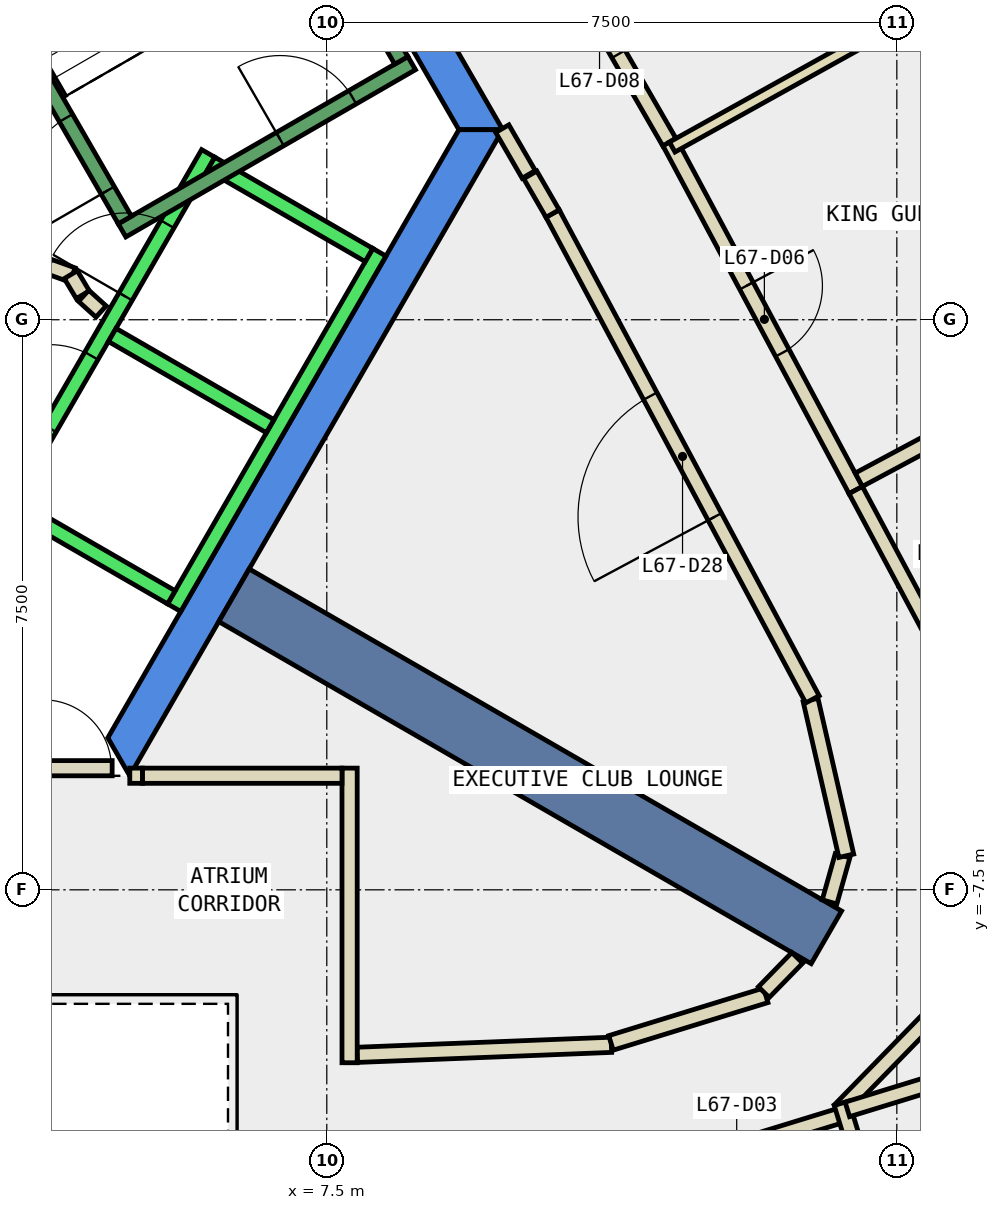
"""IFC4 building model, lengths in metres.
Left out: names, types, materials, properties, quantities, classifications, styles, units other than length and angle.
Written with IfcOpenShell. Run it as: python <this file> out.ifc"""

import sys

from ifc_helpers import new_model, si_unit, direction, frame, frame_2d, origin, place, context, subcontext, project, spatial, polyline, rectangle, outline, extrude, element, fill, save


model = new_model("IFC4")
c1 = context("Model", 3, precision=1e-05, world=origin(), true_north=direction((0.0, 1.0)))
c2 = subcontext(c1, "Body", "Model", "MODEL_VIEW")
j1 = project(units=[si_unit("LENGTHUNIT", "METRE"), si_unit("PLANEANGLEUNIT", "RADIAN")], contexts=[c1])
p1 = place(None, origin())
s1 = spatial("IfcSite", under=j1, at=p1, CompositionType="ELEMENT")
p2 = place(p1, origin())
s2 = spatial("IfcBuilding", under=s1, at=p2, CompositionType="ELEMENT")
p3 = place(p2, frame((0.0, 0.0, 290.0)))
s3 = spatial("IfcBuildingStorey", under=s2, at=p3, CompositionType="ELEMENT", Elevation=290.0)
p4 = place(p3, frame((0.0, 0.0, -0.34)))
e1 = element("IfcWall", 1, at=p4, inside=s3, PredefinedType="SHEAR", context=c2, shape_type="SweptSolid", body=[
    extrude(outline(polyline([(5.486, 9.998), (5.053, 9.748), (9.238, 2.5), (9.815, 2.5), (5.486, 9.998)])), origin(), (0.0, 0.0, 1.0), 3.6),
])
p5 = place(p3, frame((0.0, 0.0, -0.34)))
e2 = element("IfcWall", 2, at=p5, inside=s3, PredefinedType="SHEAR", context=c2, shape_type="SweptSolid", body=[
    extrude(outline(polyline([(4.907, -6.0), (9.815, 2.5), (9.238, 2.5), (4.619, -5.5), (4.907, -6.0)])), origin(), (0.0, 0.0, 1.0), 3.6),
])
p6 = place(p3, frame((6.279, -3.625, -0.34), z_axis=(0.0, 0.0, 1.0), x_axis=(0.866017533419, -0.500013631625, 0.0)))
e3 = element("IfcWall", 3, at=p6, inside=s3, PredefinedType="SHEAR", context=c2, shape_type="SweptSolid", body=[
    extrude(rectangle(XDim=9.0, YDim=0.8, at=frame_2d((4.5, 0.0))), origin(), (0.0, 0.0, 1.0), 3.6),
])
p7 = place(p3, frame((7.9, -9.671, 0.0), z_axis=(0.0, 0.0, 1.0), x_axis=(0.999223751627, 0.039394088186, 0.0)))
e4 = element("IfcWall", 4, at=p7, inside=s3, PredefinedType="PARTITIONING", context=c2, shape_type="SweptSolid", body=[
    extrude(rectangle(XDim=3.347, YDim=0.2, at=frame_2d((1.673, 0.0))), origin(), (0.0, 0.0, 1.0), 3.26),
])
p8 = place(p3, frame((11.239, -9.514, 0.0), z_axis=(0.0, 0.0, 1.0), x_axis=(0.955838469047, 0.293892533234, 0.0)))
e5 = element("IfcWall", 5, at=p8, inside=s3, PredefinedType="PARTITIONING", context=c2, shape_type="SweptSolid", body=[
    extrude(rectangle(XDim=2.13, YDim=0.2, at=frame_2d((1.065, 0.0))), origin(), (0.0, 0.0, 1.0), 3.26),
])
p9 = place(p3, frame((13.25, -8.846, 0.0), z_axis=(0.0, 0.0, 1.0), x_axis=(0.698333537371, 0.715772499181, 0.0)))
e6 = element("IfcWall", 6, at=p9, inside=s3, PredefinedType="PARTITIONING", context=c2, shape_type="SweptSolid", body=[
    extrude(rectangle(XDim=0.63, YDim=0.2, at=frame_2d((0.315, 0.0))), origin(), (0.0, 0.0, 1.0), 3.26),
])
p10 = place(p3, frame((14.115, -7.659, 0.0), z_axis=(0.0, 0.0, 1.0), x_axis=(0.270633612894, 0.96268242301, 0.0)))
e7 = element("IfcWall", 7, at=p10, inside=s3, PredefinedType="PARTITIONING", context=c2, shape_type="SweptSolid", body=[
    extrude(rectangle(XDim=0.632, YDim=0.2, at=frame_2d((0.316, 0.0))), origin(), (0.0, 0.0, 1.0), 3.26),
])
p11 = place(p3, frame((14.335, -7.052, 0.0), z_axis=(0.0, 0.0, 1.0), x_axis=(-0.22355315143, 0.974691740237, 0.0)))
e8 = element("IfcWall", 8, at=p11, inside=s3, PredefinedType="PARTITIONING", context=c2, shape_type="SweptSolid", body=[
    extrude(rectangle(XDim=2.102, YDim=0.2, at=frame_2d((1.051, 0.0))), origin(), (0.0, 0.0, 1.0), 3.26),
])
p12 = place(p3, frame((13.89, -4.994, 0.0), z_axis=(0.0, 0.0, 1.0), x_axis=(-0.471713767504, 0.881751734644, 0.0)))
e9 = element("IfcWall", 9, at=p12, inside=s3, PredefinedType="PARTITIONING", context=c2, shape_type="SweptSolid", body=[
    extrude(rectangle(XDim=7.248, YDim=0.2, at=frame_2d((3.624, 0.0))), origin(), (0.0, 0.0, 1.0), 3.26),
])
p13 = place(p12, frame((2.724, 0.0, 0.0)))
e10 = element("IfcOpeningElement", 10, at=p13, cuts=e9, PredefinedType="OPENING", context=c2, shape_type="SweptSolid", body=[
    extrude(rectangle(XDim=1.8, YDim=2.1, at=frame_2d((0.9, 1.05))), frame((0.0, 0.11, 0.0), z_axis=(0.0, -1.0, 0.0), x_axis=(1.0, 0.0, 0.0)), (0.0, 0.0, 1.0), 0.22),
])
p14 = place(p3, frame((10.471, 1.397, 0.0), z_axis=(0.0, 0.0, 1.0), x_axis=(-0.500069990121, 0.865984991198, 0.0)))
e11 = element("IfcWall", 11, at=p14, inside=s3, PredefinedType="PARTITIONING", context=c2, shape_type="SweptSolid", body=[
    extrude(rectangle(XDim=0.588, YDim=0.2, at=frame_2d((0.294, 0.0))), origin(), (0.0, 0.0, 1.0), 3.26),
])
p15 = place(p3, frame((10.157, 1.912, 0.0), z_axis=(0.0, 0.0, 1.0), x_axis=(-0.500482383858, 0.865746720148, 0.0)))
e12 = element("IfcWall", 12, at=p15, inside=s3, PredefinedType="PARTITIONING", context=c2, shape_type="SweptSolid", body=[
    extrude(rectangle(XDim=0.695, YDim=0.2, at=frame_2d((0.348, 0.0))), origin(), (0.0, 0.0, 1.0), 3.26),
])
p16 = place(p3, frame((14.243, -10.474, 0.0), z_axis=(0.0, 0.0, 1.0), x_axis=(-0.955937788993, -0.293569316475, 0.0)))
e13 = element("IfcWall", 13, at=p16, inside=s3, PredefinedType="PARTITIONING", context=c2, shape_type="SweptSolid", body=[
    extrude(rectangle(XDim=2.823, YDim=0.2, at=frame_2d((1.412, 0.0))), origin(), (0.0, 0.0, 1.0), 3.26),
])
p17 = place(p16, frame((0.912, 0.0, 0.0)))
e14 = element("IfcOpeningElement", 14, at=p17, cuts=e13, PredefinedType="OPENING", context=c2, shape_type="SweptSolid", body=[
    extrude(rectangle(XDim=1.0, YDim=2.1, at=frame_2d((0.5, 1.05))), frame((0.0, 0.11, 0.0), z_axis=(0.0, -1.0, 0.0), x_axis=(1.0, 0.0, 0.0)), (0.0, 0.0, 1.0), 0.22),
])
p18 = place(p3, frame((15.535, -9.081, 0.0), z_axis=(0.0, 0.0, 1.0), x_axis=(-0.698342132704, -0.715764113162, 0.0)))
e15 = element("IfcWall", 15, at=p18, inside=s3, PredefinedType="PARTITIONING", context=c2, shape_type="SweptSolid", body=[
    extrude(rectangle(XDim=1.836, YDim=0.2, at=frame_2d((0.918, 0.0))), origin(), (0.0, 0.0, 1.0), 3.26),
])
p19 = place(p3, frame((12.009, 2.338, 0.0), z_axis=(0.0, 0.0, 1.0), x_axis=(0.471771260231, -0.88172097515, 0.0)))
e16 = element("IfcWall", 16, at=p19, inside=s3, PredefinedType="PARTITIONING", context=c2, shape_type="SweptSolid", body=[
    extrude(rectangle(XDim=5.193, YDim=0.2, at=frame_2d((2.597, 0.0))), origin(), (0.0, 0.0, 1.0), 3.26),
])
p20 = place(p19, frame((2.146, 0.0, 0.0)))
e17 = element("IfcOpeningElement", 17, at=p20, cuts=e16, PredefinedType="OPENING", context=c2, shape_type="SweptSolid", body=[
    extrude(rectangle(XDim=1.0, YDim=2.1, at=frame_2d((0.5, 1.05))), frame((0.0, 0.11, 0.0), z_axis=(0.0, -1.0, 0.0), x_axis=(1.0, 0.0, 0.0)), (0.0, 0.0, 1.0), 0.22),
])
p21 = place(p3, frame((14.459, -2.241, 0.0), z_axis=(0.0, 0.0, 1.0), x_axis=(0.471648235011, -0.881786789656, 0.0)))
e18 = element("IfcWall", 18, at=p21, inside=s3, PredefinedType="PARTITIONING", context=c2, shape_type="SweptSolid", body=[
    extrude(rectangle(XDim=2.199, YDim=0.2, at=frame_2d((1.1, 0.0))), origin(), (0.0, 0.0, 1.0), 3.26),
])
p22 = place(p3, frame((10.17, 5.519, 0.0), z_axis=(0.0, 0.0, 1.0), x_axis=(0.499990860175, -0.866030680601, 0.0)))
e19 = element("IfcWall", 19, at=p22, inside=s3, PredefinedType="PARTITIONING", context=c2, shape_type="SweptSolid", body=[
    extrude(rectangle(XDim=3.674, YDim=0.2, at=frame_2d((1.837, 0.0))), origin(), (0.0, 0.0, 1.0), 3.26),
])
p23 = place(p22, frame((1.337, 0.0, 0.0)))
e20 = element("IfcOpeningElement", 20, at=p23, cuts=e19, PredefinedType="OPENING", context=c2, shape_type="SweptSolid", body=[
    extrude(rectangle(XDim=1.0, YDim=2.1, at=frame_2d((0.5, 1.05))), frame((0.0, 0.11, 0.0), z_axis=(0.0, -1.0, 0.0), x_axis=(1.0, 0.0, 0.0)), (0.0, 0.0, 1.0), 0.22),
])
p24 = place(p3, frame((3.838, 0.702, 0.0), z_axis=(0.0, 0.0, 1.0), x_axis=(0.941035081519, -0.338308993895, 0.0)))
e21 = element("IfcWall", 21, at=p24, inside=s3, PredefinedType="PARTITIONING", context=c2, shape_type="SweptSolid", body=[
    extrude(rectangle(XDim=0.337, YDim=0.2, at=frame_2d((0.168, 0.0))), origin(), (0.0, 0.0, 1.0), 3.26),
])
p25 = place(p3, frame((4.132, 0.593, 0.0), z_axis=(0.0, 0.0, 1.0), x_axis=(0.513561617048, -0.858052717201, 0.0)))
e22 = element("IfcWall", 22, at=p25, inside=s3, PredefinedType="PARTITIONING", context=c2, shape_type="SweptSolid", body=[
    extrude(rectangle(XDim=0.308, YDim=0.2, at=frame_2d((0.154, 0.0))), origin(), (0.0, 0.0, 1.0), 3.26),
])
p26 = place(p3, frame((4.301, 0.315, 0.0), z_axis=(0.0, 0.0, 1.0), x_axis=(0.741798017506, -0.670623367639, 0.0)))
e23 = element("IfcWall", 23, at=p26, inside=s3, PredefinedType="PARTITIONING", context=c2, shape_type="SweptSolid", body=[
    extrude(rectangle(XDim=0.309, YDim=0.2, at=frame_2d((0.154, 0.0))), origin(), (0.0, 0.0, 1.0), 3.26),
])
p27 = place(p3, frame((4.908, -5.999, 0.0), z_axis=(0.0, 0.0, 1.0), x_axis=(1.0, 0.0, 0.0)))
e24 = element("IfcWall", 24, at=p27, inside=s3, PredefinedType="PARTITIONING", context=c2, shape_type="SweptSolid", body=[
    extrude(rectangle(XDim=0.168, YDim=0.2, at=frame_2d((0.084, 0.0))), origin(), (0.0, 0.0, 1.0), 2.4),
])
p28 = place(p3, frame((7.8, -5.899, 0.0), z_axis=(0.0, 0.0, 1.0), x_axis=(0.0, -1.0, 0.0)))
e25 = element("IfcWall", 25, at=p28, inside=s3, PredefinedType="PARTITIONING", context=c2, shape_type="SweptSolid", body=[
    extrude(rectangle(XDim=3.876, YDim=0.2, at=frame_2d((1.938, 0.0))), origin(), (0.0, 0.0, 1.0), 3.26),
])
p29 = place(p3, frame((14.272, -10.308, 0.0), z_axis=(0.0, 0.0, 1.0), x_axis=(0.293868765171, -0.955845776711, 0.0)))
e26 = element("IfcWall", 26, at=p29, inside=s3, PredefinedType="PARTITIONING", context=c2, shape_type="SweptSolid", body=[
    extrude(rectangle(XDim=2.45, YDim=0.2, at=frame_2d((1.225, 0.0))), origin(), (0.0, 0.0, 1.0), 3.26),
])
p30 = place(p3, frame((16.022, -9.875, 0.0), z_axis=(0.0, 0.0, 1.0), x_axis=(-0.955908620472, -0.293664279932, 0.0)))
e27 = element("IfcWall", 27, at=p30, inside=s3, PredefinedType="PARTITIONING", context=c2, shape_type="SweptSolid", body=[
    extrude(rectangle(XDim=1.75, YDim=0.2, at=frame_2d((0.875, 0.0))), origin(), (0.0, 0.0, 1.0), 3.26),
])
p31 = place(p3, frame((16.44, -1.067, 0.0), z_axis=(0.0, 0.0, 1.0), x_axis=(-0.881700916894, -0.471808746367, 0.0)))
e28 = element("IfcWall", 28, at=p31, inside=s3, PredefinedType="PARTITIONING", context=c2, shape_type="SweptSolid", body=[
    extrude(rectangle(XDim=2.2, YDim=0.2, at=frame_2d((1.1, 0.0))), origin(), (0.0, 0.0, 1.0), 3.26),
])
p32 = place(p3, frame((12.045, 2.272, 0.0), z_axis=(0.0, 0.0, 1.0), x_axis=(0.873982340973, 0.485957680943, 0.0)))
e29 = element("IfcWall", 29, at=p32, inside=s3, PredefinedType="PARTITIONING", context=c2, shape_type="SweptSolid", body=[
    extrude(rectangle(XDim=4.28, YDim=0.15, at=frame_2d((2.14, 0.0))), origin(), (0.0, 0.0, 1.0), 3.26),
])
p33 = place(p3, frame((3.75, -5.9, 0.0), z_axis=(0.0, 0.0, 1.0), x_axis=(1.0, 0.0, 0.0)))
e30 = element("IfcWall", 30, at=p33, inside=s3, PredefinedType="PARTITIONING", context=c2, shape_type="SweptSolid", body=[
    extrude(rectangle(XDim=0.926, YDim=0.2, at=frame_2d((0.463, 0.0))), origin(), (0.0, 0.0, 1.0), 2.4),
])
p34 = place(p33, frame((0.017, 0.0, 0.0)))
e31 = element("IfcOpeningElement", 31, at=p34, cuts=e30, PredefinedType="OPENING", context=c2, shape_type="SweptSolid", body=[
    extrude(rectangle(XDim=0.9, YDim=2.1, at=frame_2d((0.45, 1.05))), frame((0.0, 0.11, 0.0), z_axis=(0.0, -1.0, 0.0), x_axis=(1.0, 0.0, 0.0)), (0.0, 0.0, 1.0), 0.22),
])
p35 = place(p3, frame((5.076, -5.999, 0.0), z_axis=(0.0, 0.0, 1.0), x_axis=(1.0, 0.0, 0.0)))
e32 = element("IfcWall", 32, at=p35, inside=s3, PredefinedType="PARTITIONING", context=c2, shape_type="SweptSolid", body=[
    extrude(rectangle(XDim=2.624, YDim=0.2, at=frame_2d((1.312, 0.0))), origin(), (0.0, 0.0, 1.0), 3.26),
])
p36 = place(p3, frame((3.24, -2.488, 0.0), z_axis=(0.0, 0.0, 1.0), x_axis=(0.500034260056, 0.866005622828, 0.0)))
e33 = element("IfcWall", 33, at=p36, inside=s3, PredefinedType="STANDARD", context=c2, shape_type="SweptSolid", body=[
    extrude(rectangle(XDim=5.399, YDim=0.2, at=frame_2d((2.7, 0.0))), origin(), (0.0, 0.0, 1.0), 3.26),
])
p37 = place(p36, frame((3.225, 0.0, 0.0)))
e34 = element("IfcOpeningElement", 34, at=p37, cuts=e33, PredefinedType="OPENING", context=c2, shape_type="SweptSolid", body=[
    extrude(rectangle(XDim=1.1, YDim=2.1, at=frame_2d((0.55, 1.05))), frame((0.0, 0.11, 0.0), z_axis=(0.0, -1.0, 0.0), x_axis=(1.0, 0.0, 0.0)), (0.0, 0.0, 1.0), 0.22),
])
p38 = place(p36, frame((1.225, 0.0, 0.0)))
e35 = element("IfcOpeningElement", 35, at=p38, cuts=e33, PredefinedType="OPENING", context=c2, shape_type="SweptSolid", body=[
    extrude(rectangle(XDim=1.1, YDim=2.1, at=frame_2d((0.55, 1.05))), frame((0.0, 0.11, 0.0), z_axis=(0.0, -1.0, 0.0), x_axis=(1.0, 0.0, 0.0)), (0.0, 0.0, 1.0), 0.22),
])
p39 = place(p3, frame((5.492, -3.788, 0.0), z_axis=(0.0, 0.0, 1.0), x_axis=(0.500034260056, 0.866005622828, 0.0)))
e36 = element("IfcWall", 36, at=p39, inside=s3, PredefinedType="STANDARD", context=c2, shape_type="SweptSolid", body=[
    extrude(rectangle(XDim=5.399, YDim=0.2, at=frame_2d((2.7, 0.0))), origin(), (0.0, 0.0, 1.0), 3.26),
])
p40 = place(p3, frame((3.377, -2.452, 0.0), z_axis=(0.0, 0.0, 1.0), x_axis=(0.865955154139, -0.50012165622, 0.0)))
e37 = element("IfcWall", 37, at=p40, inside=s3, PredefinedType="STANDARD", context=c2, shape_type="SweptSolid", body=[
    extrude(rectangle(XDim=2.4, YDim=0.2, at=frame_2d((1.2, 0.0))), origin(), (0.0, 0.0, 1.0), 3.26),
])
for number, where, z_axis, x_axis in (
    (38, (4.677, -0.2, 0.0), (0.0, 0.0, 1.0), (0.866, -0.5, 0.0)),
    (39, (5.977, 2.052, 0.0), (0.0, 0.0, 1.0), (0.866, -0.5, 0.0)),
):
    element("IfcWall", number, at=place(p3, frame(where, z_axis=z_axis, x_axis=x_axis)), inside=s3, PredefinedType="STANDARD", context=c2, shape_type="SweptSolid", body=[
        extrude(rectangle(XDim=2.399, YDim=0.2, at=frame_2d((1.2, 0.0))), origin(), (0.0, 0.0, 1.0), 3.26),
    ])
p41 = place(p3, frame((4.806, 1.176, 0.0), z_axis=(0.0, 0.0, 1.0), x_axis=(0.866059941101, 0.499940174841, 0.0)))
e40 = element("IfcWall", 40, at=p41, inside=s3, PredefinedType="STANDARD", context=c2, shape_type="SweptSolid", body=[
    extrude(rectangle(XDim=4.4, YDim=0.2, at=frame_2d((2.2, 0.0))), origin(), (0.0, 0.0, 1.0), 3.26),
])
p42 = place(p41, frame((2.4, 0.0, 0.0)))
e41 = element("IfcOpeningElement", 41, at=p42, cuts=e40, PredefinedType="OPENING", context=c2, shape_type="SweptSolid", body=[
    extrude(rectangle(XDim=1.1, YDim=2.2, at=frame_2d((0.55, 1.1))), frame((0.0, 0.11, 0.0), z_axis=(0.0, -1.0, 0.0), x_axis=(1.0, 0.0, 0.0)), (0.0, 0.0, 1.0), 0.22),
])
p43 = place(p3, frame((4.843, 1.312, 0.0), z_axis=(0.0, 0.0, 1.0), x_axis=(-0.499963383562, 0.866046543262, 0.0)))
e42 = element("IfcWall", 42, at=p43, inside=s3, PredefinedType="STANDARD", context=c2, shape_type="SweptSolid", body=[
    extrude(rectangle(XDim=6.9, YDim=0.2, at=frame_2d((3.45, 0.0))), origin(), (0.0, 0.0, 1.0), 3.26),
])
p44 = place(p43, frame((0.45, 0.0, 0.0)))
e43 = element("IfcOpeningElement", 43, at=p44, cuts=e42, PredefinedType="OPENING", context=c2, shape_type="SweptSolid", body=[
    extrude(rectangle(XDim=1.1, YDim=2.2, at=frame_2d((0.55, 1.1))), frame((0.0, 0.11, 0.0), z_axis=(0.0, -1.0, 0.0), x_axis=(1.0, 0.0, 0.0)), (0.0, 0.0, 1.0), 0.22),
])
p45 = place(p3, frame((8.48, 3.412, 0.0), z_axis=(0.0, 0.0, 1.0), x_axis=(-0.499978703459, 0.866037698999, 0.0)))
e44 = element("IfcWall", 44, at=p45, inside=s3, PredefinedType="STANDARD", context=c2, shape_type="SweptSolid", body=[
    extrude(rectangle(XDim=6.9, YDim=0.2, at=frame_2d((3.45, 0.0))), origin(), (0.0, 0.0, 1.0), 3.26),
])
p46 = place(p20, origin())
e45 = element("IfcDoor", 45, at=p46, inside=s3, OperationType="SINGLE_SWING_LEFT", PredefinedType="DOOR", context=c2, shape_type="SweptSolid", body=[
    extrude(rectangle(XDim=1.0, YDim=2.1, at=frame_2d((0.5, 1.05))), frame((0.0, 0.025, 0.0), z_axis=(0.0, -1.0, 0.0), x_axis=(1.0, 0.0, 0.0)), (0.0, 0.0, 1.0), 0.05),
])
fill(e17, e45)
p47 = place(p23, origin())
e46 = element("IfcDoor", 46, at=p47, inside=s3, OperationType="SINGLE_SWING_LEFT", PredefinedType="DOOR", context=c2, shape_type="SweptSolid", body=[
    extrude(rectangle(XDim=1.0, YDim=2.1, at=frame_2d((0.5, 1.05))), frame((0.0, 0.025, 0.0), z_axis=(0.0, -1.0, 0.0), x_axis=(1.0, 0.0, 0.0)), (0.0, 0.0, 1.0), 0.05),
])
fill(e20, e46)
p48 = place(p13, origin())
e47 = element("IfcDoor", 47, at=p48, inside=s3, OperationType="DOUBLE_DOOR_SINGLE_SWING", PredefinedType="DOOR", context=c2, shape_type="SweptSolid", body=[
    extrude(rectangle(XDim=1.8, YDim=2.1, at=frame_2d((0.9, 1.05))), frame((0.0, 0.025, 0.0), z_axis=(0.0, -1.0, 0.0), x_axis=(1.0, 0.0, 0.0)), (0.0, 0.0, 1.0), 0.05),
])
fill(e10, e47)
p49 = place(p34, origin())
e48 = element("IfcDoor", 48, at=p49, inside=s3, OperationType="SINGLE_SWING_LEFT", PredefinedType="DOOR", context=c2, shape_type="SweptSolid", body=[
    extrude(rectangle(XDim=0.9, YDim=2.1, at=frame_2d((0.45, 1.05))), frame((0.0, 0.025, 0.0), z_axis=(0.0, -1.0, 0.0), x_axis=(1.0, 0.0, 0.0)), (0.0, 0.0, 1.0), 0.05),
])
fill(e31, e48)
p50 = place(p37, origin())
e49 = element("IfcDoor", 49, at=p50, inside=s3, OperationType="SLIDING_TO_LEFT", PredefinedType="DOOR", context=c2, shape_type="SweptSolid", body=[
    extrude(rectangle(XDim=1.1, YDim=2.1, at=frame_2d((0.55, 1.05))), frame((0.0, 0.025, 0.0), z_axis=(0.0, -1.0, 0.0), x_axis=(1.0, 0.0, 0.0)), (0.0, 0.0, 1.0), 0.05),
])
fill(e34, e49)
p51 = place(p38, origin())
e50 = element("IfcDoor", 50, at=p51, inside=s3, OperationType="SLIDING_TO_LEFT", PredefinedType="DOOR", context=c2, shape_type="SweptSolid", body=[
    extrude(rectangle(XDim=1.1, YDim=2.1, at=frame_2d((0.55, 1.05))), frame((0.0, 0.025, 0.0), z_axis=(0.0, -1.0, 0.0), x_axis=(1.0, 0.0, 0.0)), (0.0, 0.0, 1.0), 0.05),
])
fill(e35, e50)
p52 = place(p44, origin())
e51 = element("IfcDoor", 51, at=p52, inside=s3, OperationType="SINGLE_SWING_LEFT", PredefinedType="DOOR", context=c2, shape_type="SweptSolid", body=[
    extrude(rectangle(XDim=1.1, YDim=2.2, at=frame_2d((0.55, 1.1))), frame((0.0, 0.025, 0.0), z_axis=(0.0, -1.0, 0.0), x_axis=(1.0, 0.0, 0.0)), (0.0, 0.0, 1.0), 0.05),
])
fill(e43, e51)
p53 = place(p42, origin())
e52 = element("IfcDoor", 52, at=p53, inside=s3, OperationType="SINGLE_SWING_LEFT", PredefinedType="DOOR", context=c2, shape_type="SweptSolid", body=[
    extrude(rectangle(XDim=1.1, YDim=2.2, at=frame_2d((0.55, 1.1))), frame((0.0, 0.025, 0.0), z_axis=(0.0, -1.0, 0.0), x_axis=(1.0, 0.0, 0.0)), (0.0, 0.0, 1.0), 0.05),
])
fill(e41, e52)
save(model, sys.argv[1])
